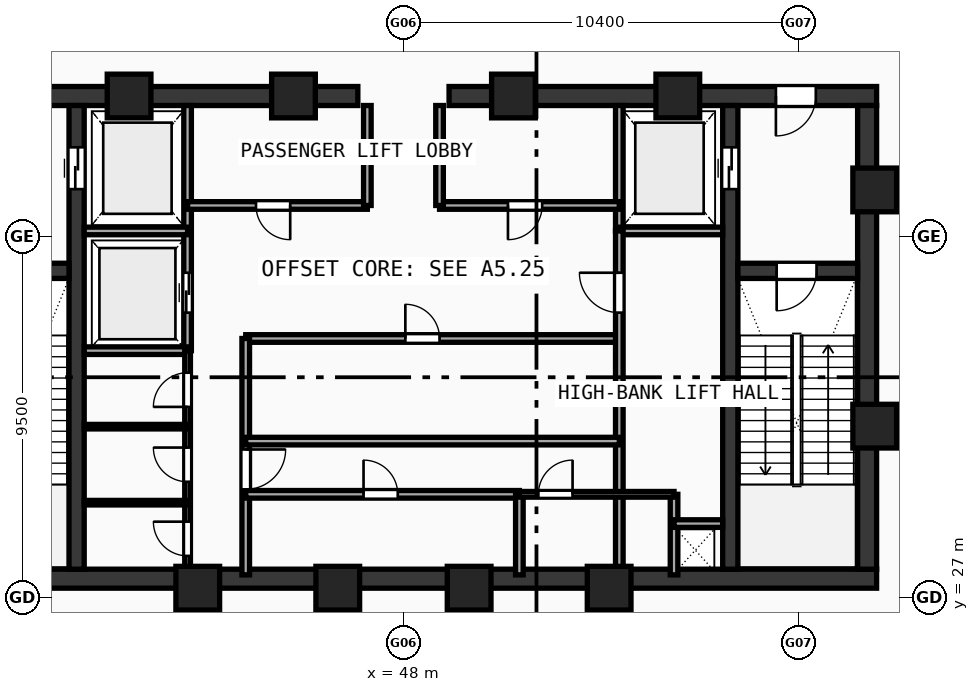
"""IFC4 building model, lengths in metres.
Left out: names, types, materials, properties, quantities, classifications, styles, units other than length and angle.
Written with IfcOpenShell. Run it as: python <this file> out.ifc"""

import sys

from ifc_helpers import new_model, si_unit, direction, frame, frame_2d, origin, origin_with_axes, origin_2d, place, context, subcontext, project, spatial, rectangle, hollow_rectangle, extrude, source, transform, mapped, element, fill, save


model = new_model("IFC4")
c1 = context("Model", 3, precision=1e-05, world=origin(), true_north=direction((0.0, 1.0)))
c2 = subcontext(c1, "Body", "Model", "MODEL_VIEW")
j1 = project(units=[si_unit("LENGTHUNIT", "METRE"), si_unit("PLANEANGLEUNIT", "RADIAN")], contexts=[c1])
p1 = place(None, origin())
s1 = spatial("IfcSite", under=j1, at=p1, CompositionType="ELEMENT")
p2 = place(p1, origin())
s2 = spatial("IfcBuilding", under=s1, at=p2, CompositionType="ELEMENT")
p3 = place(p2, frame((0.0, 0.0, 391.76)))
s3 = spatial("IfcBuildingStorey", under=s2, at=p3, CompositionType="ELEMENT", Elevation=391.76)
p4 = place(p3, frame((35.55, 27.5, 0.0), z_axis=(0.0, 0.0, 1.0), x_axis=(1.0, 0.0, 0.0)))
e1 = element("IfcWall", 1, at=p4, inside=s3, PredefinedType="SHEAR", context=c2, shape_type="SweptSolid", body=[
    extrude(rectangle(XDim=24.9, YDim=0.5, at=frame_2d((12.45, 0.0))), origin(), (0.0, 0.0, 1.0), 4.72),
])
p5 = place(p3, frame((35.55, 40.2, 0.0), z_axis=(0.0, 0.0, 1.0), x_axis=(1.0, 0.0, 0.0)))
e2 = element("IfcWall", 2, at=p5, inside=s3, PredefinedType="SHEAR", context=c2, shape_type="SweptSolid", body=[
    extrude(rectangle(XDim=11.25, YDim=0.5, at=frame_2d((5.625, 0.0))), origin(), (0.0, 0.0, 1.0), 4.72),
])
p6 = place(p5, frame((1.6, 0.0, 0.0)))
e3 = element("IfcOpeningElement", 3, at=p6, cuts=e2, PredefinedType="OPENING", context=c2, shape_type="SweptSolid", body=[
    extrude(rectangle(XDim=1.05, YDim=2.1, at=frame_2d((0.525, 1.05))), frame((0.0, 0.26, 0.0), z_axis=(0.0, -1.0, 0.0), x_axis=(1.0, 0.0, 0.0)), (0.0, 0.0, 1.0), 0.52),
])
p7 = place(p3, frame((49.2, 40.2, 0.0), z_axis=(0.0, 0.0, 1.0), x_axis=(1.0, 0.0, 0.0)))
e4 = element("IfcWall", 4, at=p7, inside=s3, PredefinedType="SHEAR", context=c2, shape_type="SweptSolid", body=[
    extrude(rectangle(XDim=11.25, YDim=0.5, at=frame_2d((5.625, 0.0))), origin(), (0.0, 0.0, 1.0), 4.72),
])
p8 = place(p7, frame((8.6, 0.0, 0.0)))
e5 = element("IfcOpeningElement", 5, at=p8, cuts=e4, PredefinedType="OPENING", context=c2, shape_type="SweptSolid", body=[
    extrude(rectangle(XDim=1.05, YDim=2.1, at=frame_2d((0.525, 1.05))), frame((0.0, 0.26, 0.0), z_axis=(0.0, -1.0, 0.0), x_axis=(1.0, 0.0, 0.0)), (0.0, 0.0, 1.0), 0.52),
])
p9 = place(p3, frame((60.2, 27.75, 0.0), z_axis=(0.0, 0.0, 1.0), x_axis=(0.0, 1.0, 0.0)))
e6 = element("IfcWall", 6, at=p9, inside=s3, PredefinedType="SHEAR", context=c2, shape_type="SweptSolid", body=[
    extrude(rectangle(XDim=12.2, YDim=0.5, at=frame_2d((6.1, 0.0))), origin(), (0.0, 0.0, 1.0), 4.72),
])
p10 = place(p3, frame((39.4, 27.75, 0.0), z_axis=(0.0, 0.0, 1.0), x_axis=(0.0, 1.0, 0.0)))
e7 = element("IfcWall", 7, at=p10, inside=s3, PredefinedType="SHEAR", context=c2, shape_type="SweptSolid", body=[
    extrude(rectangle(XDim=12.2, YDim=0.4, at=frame_2d((6.1, 0.0))), origin(), (0.0, 0.0, 1.0), 4.72),
])
p11 = place(p10, frame((10.0, 0.0, 0.0)))
e8 = element("IfcOpeningElement", 8, at=p11, cuts=e7, PredefinedType="OPENING", context=c2, shape_type="SweptSolid", body=[
    extrude(rectangle(XDim=1.1, YDim=2.1, at=frame_2d((0.55, 1.05))), frame((0.0, 0.21, 0.0), z_axis=(0.0, -1.0, 0.0), x_axis=(1.0, 0.0, 0.0)), (0.0, 0.0, 1.0), 0.42),
])
p12 = place(p3, frame((56.6, 27.75, 0.0), z_axis=(0.0, 0.0, 1.0), x_axis=(0.0, 1.0, 0.0)))
e9 = element("IfcWall", 9, at=p12, inside=s3, PredefinedType="SHEAR", context=c2, shape_type="SweptSolid", body=[
    extrude(rectangle(XDim=12.2, YDim=0.4, at=frame_2d((6.1, 0.0))), origin(), (0.0, 0.0, 1.0), 4.72),
])
p13 = place(p12, frame((10.0, 0.0, 0.0)))
e10 = element("IfcOpeningElement", 10, at=p13, cuts=e9, PredefinedType="OPENING", context=c2, shape_type="SweptSolid", body=[
    extrude(rectangle(XDim=1.1, YDim=2.1, at=frame_2d((0.55, 1.05))), frame((0.0, 0.21, 0.0), z_axis=(0.0, -1.0, 0.0), x_axis=(1.0, 0.0, 0.0)), (0.0, 0.0, 1.0), 0.42),
])
p14 = place(p3, frame((36.05, 35.6, 0.0), z_axis=(0.0, 0.0, 1.0), x_axis=(1.0, 0.0, 0.0)))
e11 = element("IfcWall", 11, at=p14, inside=s3, PredefinedType="SHEAR", context=c2, shape_type="SweptSolid", body=[
    extrude(rectangle(XDim=3.15, YDim=0.4, at=frame_2d((1.575, 0.0))), origin(), (0.0, 0.0, 1.0), 4.72),
])
p15 = place(p14, frame((1.07, 0.0, 0.0)))
e12 = element("IfcOpeningElement", 12, at=p15, cuts=e11, PredefinedType="OPENING", context=c2, shape_type="SweptSolid", body=[
    extrude(rectangle(XDim=1.05, YDim=2.1, at=frame_2d((0.525, 1.05))), frame((0.0, 0.21, 0.0), z_axis=(0.0, -1.0, 0.0), x_axis=(1.0, 0.0, 0.0)), (0.0, 0.0, 1.0), 0.42),
])
p16 = place(p3, frame((56.8, 35.6, 0.0), z_axis=(0.0, 0.0, 1.0), x_axis=(1.0, 0.0, 0.0)))
e13 = element("IfcWall", 13, at=p16, inside=s3, PredefinedType="SHEAR", context=c2, shape_type="SweptSolid", body=[
    extrude(rectangle(XDim=3.15, YDim=0.4, at=frame_2d((1.575, 0.0))), origin(), (0.0, 0.0, 1.0), 4.72),
])
p17 = place(p16, frame((1.02, 0.0, 0.0)))
e14 = element("IfcOpeningElement", 14, at=p17, cuts=e13, PredefinedType="OPENING", context=c2, shape_type="SweptSolid", body=[
    extrude(rectangle(XDim=1.05, YDim=2.1, at=frame_2d((0.525, 1.05))), frame((0.0, 0.21, 0.0), z_axis=(0.0, -1.0, 0.0), x_axis=(1.0, 0.0, 0.0)), (0.0, 0.0, 1.0), 0.42),
])
m1 = source(origin(), c2, "Body", "SweptSolid", [
    extrude(hollow_rectangle(XDim=1.15, YDim=1.15, WallThickness=0.048, at=origin_2d()), origin(), (0.0, 0.0, 1.0), 5.0),
])
for number, where, z_axis, x_axis in (
    (15, (42.588, 27.25, -0.28), (0.0, 0.0, 1.0), (1.0, 0.0, 0.0)),
    (16, (46.272, 27.25, -0.28), (0.0, 0.0, 1.0), (1.0, 0.0, 0.0)),
    (17, (49.729, 27.25, -0.28), (0.0, 0.0, 1.0), (1.0, 0.0, 0.0)),
    (18, (53.412, 27.25, -0.28), (0.0, 0.0, 1.0), (1.0, 0.0, 0.0)),
    (19, (60.4, 31.513, -0.28), (0.0, 0.0, 1.0), (1.0, 0.0, 0.0)),
    (20, (60.4, 37.729, -0.28), (0.0, 0.0, 1.0), (1.0, 0.0, 0.0)),
    (21, (55.219, 40.2, -0.28), (0.0, 0.0, 1.0), (1.0, 0.0, 0.0)),
    (22, (50.894, 40.2, -0.28), (0.0, 0.0, 1.0), (1.0, 0.0, 0.0)),
    (23, (45.106, 40.2, -0.28), (0.0, 0.0, 1.0), (1.0, 0.0, 0.0)),
    (24, (40.781, 40.2, -0.28), (0.0, 0.0, 1.0), (1.0, 0.0, 0.0)),
):
    element("IfcColumn", number, at=place(p3, frame(where, z_axis=z_axis, x_axis=x_axis)), inside=s3, PredefinedType="COLUMN", context=c2, shape_type="MappedRepresentation", body=[
        mapped(m1, transform((0.0, 0.0, 0.0), scale=1.0)),
    ])
p18 = place(p3, frame((42.32, 33.5, 0.0), z_axis=(0.0, 0.0, 1.0), x_axis=(0.0, 1.0, 0.0)))
e25 = element("IfcWall", 25, at=p18, inside=s3, PredefinedType="SOLIDWALL", context=c2, shape_type="SweptSolid", body=[
    extrude(rectangle(XDim=6.45, YDim=0.2, at=frame_2d((3.225, 0.0))), origin(), (0.0, 0.0, 1.0), 4.72),
])
p19 = place(p18, frame((1.0, 0.0, 0.0)))
e26 = element("IfcOpeningElement", 26, at=p19, cuts=e25, PredefinedType="OPENING", context=c2, shape_type="SweptSolid", body=[
    extrude(rectangle(XDim=1.05, YDim=2.1, at=frame_2d((0.525, 1.05))), frame((0.0, 0.11, 0.0), z_axis=(0.0, -1.0, 0.0), x_axis=(1.0, 0.0, 0.0)), (0.0, 0.0, 1.0), 0.22),
])
for number, where, z_axis, x_axis in (
    (27, (39.6, 36.65, 0.0), (0.0, 0.0, 1.0), (1.0, 0.0, 0.0)),
    (28, (39.6, 33.5, 0.0), (0.0, 0.0, 1.0), (1.0, 0.0, 0.0)),
):
    element("IfcWall", number, at=place(p3, frame(where, z_axis=z_axis, x_axis=x_axis)), inside=s3, PredefinedType="SOLIDWALL", context=c2, shape_type="SweptSolid", body=[
        extrude(rectangle(XDim=2.72, YDim=0.2, at=frame_2d((1.36, 0.0))), origin(), (0.0, 0.0, 1.0), 4.72),
    ])
p20 = place(p3, frame((53.68, 36.65, 0.0), z_axis=(0.0, 0.0, 1.0), x_axis=(0.0, 1.0, 0.0)))
e29 = element("IfcWall", 29, at=p20, inside=s3, PredefinedType="SOLIDWALL", context=c2, shape_type="SweptSolid", body=[
    extrude(rectangle(XDim=3.3, YDim=0.2, at=frame_2d((1.65, 0.0))), origin(), (0.0, 0.0, 1.0), 4.72),
])
p21 = place(p3, frame((53.68, 36.65, 0.0), z_axis=(0.0, 0.0, 1.0), x_axis=(1.0, 0.0, 0.0)))
e30 = element("IfcWall", 30, at=p21, inside=s3, PredefinedType="SOLIDWALL", context=c2, shape_type="SweptSolid", body=[
    extrude(rectangle(XDim=2.72, YDim=0.2, at=frame_2d((1.36, 0.0))), origin(), (0.0, 0.0, 1.0), 4.72),
])
p22 = place(p3, frame((42.32, 37.32, 0.0), z_axis=(0.0, 0.0, 1.0), x_axis=(1.0, 0.0, 0.0)))
e31 = element("IfcWall", 31, at=p22, inside=s3, PredefinedType="SOLIDWALL", context=c2, shape_type="SweptSolid", body=[
    extrude(rectangle(XDim=4.73, YDim=0.2, at=frame_2d((2.365, 0.0))), origin(), (0.0, 0.0, 1.0), 4.72),
])
p23 = place(p22, frame((1.8, 0.0, 0.0)))
e32 = element("IfcOpeningElement", 32, at=p23, cuts=e31, PredefinedType="OPENING", context=c2, shape_type="SweptSolid", body=[
    extrude(rectangle(XDim=0.9, YDim=2.1, at=frame_2d((0.45, 1.05))), frame((0.0, 0.11, 0.0), z_axis=(0.0, -1.0, 0.0), x_axis=(1.0, 0.0, 0.0)), (0.0, 0.0, 1.0), 0.22),
])
p24 = place(p3, frame((48.95, 37.32, 0.0), z_axis=(0.0, 0.0, 1.0), x_axis=(1.0, 0.0, 0.0)))
e33 = element("IfcWall", 33, at=p24, inside=s3, PredefinedType="SOLIDWALL", context=c2, shape_type="SweptSolid", body=[
    extrude(rectangle(XDim=4.73, YDim=0.2, at=frame_2d((2.365, 0.0))), origin(), (0.0, 0.0, 1.0), 4.72),
])
p25 = place(p24, frame((1.8, 0.0, 0.0)))
e34 = element("IfcOpeningElement", 34, at=p25, cuts=e33, PredefinedType="OPENING", context=c2, shape_type="SweptSolid", body=[
    extrude(rectangle(XDim=0.9, YDim=2.1, at=frame_2d((0.45, 1.05))), frame((0.0, 0.11, 0.0), z_axis=(0.0, -1.0, 0.0), x_axis=(1.0, 0.0, 0.0)), (0.0, 0.0, 1.0), 0.22),
])
for number, where, z_axis, x_axis in (
    (35, (47.05, 37.32, 0.0), (0.0, 0.0, 1.0), (0.0, 1.0, 0.0)),
    (36, (48.95, 37.32, 0.0), (0.0, 0.0, 1.0), (0.0, 1.0, 0.0)),
):
    element("IfcWall", number, at=place(p3, frame(where, z_axis=z_axis, x_axis=x_axis)), inside=s3, PredefinedType="SOLIDWALL", context=c2, shape_type="SweptSolid", body=[
        extrude(rectangle(XDim=2.63, YDim=0.2, at=frame_2d((1.315, 0.0))), origin(), (0.0, 0.0, 1.0), 4.72),
    ])
p26 = place(p3, frame((43.85, 33.82, 0.0), z_axis=(0.0, 0.0, 1.0), x_axis=(1.0, 0.0, 0.0)))
e37 = element("IfcWall", 37, at=p26, inside=s3, PredefinedType="SOLIDWALL", context=c2, shape_type="SweptSolid", body=[
    extrude(rectangle(XDim=9.83, YDim=0.2, at=frame_2d((4.915, 0.0))), origin(), (0.0, 0.0, 1.0), 4.72),
])
p27 = place(p26, frame((4.2, 0.0, 0.0)))
e38 = element("IfcOpeningElement", 38, at=p27, cuts=e37, PredefinedType="OPENING", context=c2, shape_type="SweptSolid", body=[
    extrude(rectangle(XDim=0.9, YDim=2.1, at=frame_2d((0.45, 1.05))), frame((0.0, 0.11, 0.0), z_axis=(0.0, -1.0, 0.0), x_axis=(1.0, 0.0, 0.0)), (0.0, 0.0, 1.0), 0.22),
])
p28 = place(p3, frame((43.85, 27.6, 0.0), z_axis=(0.0, 0.0, 1.0), x_axis=(0.0, 1.0, 0.0)))
e39 = element("IfcWall", 39, at=p28, inside=s3, PredefinedType="SOLIDWALL", context=c2, shape_type="SweptSolid", body=[
    extrude(rectangle(XDim=6.22, YDim=0.2, at=frame_2d((3.11, 0.0))), origin(), (0.0, 0.0, 1.0), 4.72),
])
p29 = place(p28, frame((2.25, 0.0, 0.0)))
e40 = element("IfcOpeningElement", 40, at=p29, cuts=e39, PredefinedType="OPENING", context=c2, shape_type="SweptSolid", body=[
    extrude(rectangle(XDim=1.05, YDim=2.1, at=frame_2d((0.525, 1.05))), frame((0.0, 0.11, 0.0), z_axis=(0.0, -1.0, 0.0), x_axis=(1.0, 0.0, 0.0)), (0.0, 0.0, 1.0), 0.22),
])
p30 = place(p3, frame((53.68, 27.6, 0.0), z_axis=(0.0, 0.0, 1.0), x_axis=(0.0, 1.0, 0.0)))
e41 = element("IfcWall", 41, at=p30, inside=s3, PredefinedType="SOLIDWALL", context=c2, shape_type="SweptSolid", body=[
    extrude(rectangle(XDim=9.05, YDim=0.2, at=frame_2d((4.525, 0.0))), origin(), (0.0, 0.0, 1.0), 4.72),
])
p31 = place(p30, frame((6.9, 0.0, 0.0)))
e42 = element("IfcOpeningElement", 42, at=p31, cuts=e41, PredefinedType="OPENING", context=c2, shape_type="SweptSolid", body=[
    extrude(rectangle(XDim=1.05, YDim=2.1, at=frame_2d((0.525, 1.05))), frame((0.0, 0.11, 0.0), z_axis=(0.0, -1.0, 0.0), x_axis=(1.0, 0.0, 0.0)), (0.0, 0.0, 1.0), 0.22),
])
p32 = place(p3, frame((43.85, 29.72, 0.0), z_axis=(0.0, 0.0, 1.0), x_axis=(1.0, 0.0, 0.0)))
e43 = element("IfcWall", 43, at=p32, inside=s3, PredefinedType="SOLIDWALL", context=c2, shape_type="SweptSolid", body=[
    extrude(rectangle(XDim=7.2, YDim=0.2, at=frame_2d((3.6, 0.0))), origin(), (0.0, 0.0, 1.0), 4.72),
])
p33 = place(p32, frame((3.1, 0.0, 0.0)))
e44 = element("IfcOpeningElement", 44, at=p33, cuts=e43, PredefinedType="OPENING", context=c2, shape_type="SweptSolid", body=[
    extrude(rectangle(XDim=0.9, YDim=2.1, at=frame_2d((0.45, 1.05))), frame((0.0, 0.11, 0.0), z_axis=(0.0, -1.0, 0.0), x_axis=(1.0, 0.0, 0.0)), (0.0, 0.0, 1.0), 0.22),
])
p34 = place(p3, frame((51.05, 27.6, 0.0), z_axis=(0.0, 0.0, 1.0), x_axis=(0.0, 1.0, 0.0)))
e45 = element("IfcWall", 45, at=p34, inside=s3, PredefinedType="SOLIDWALL", context=c2, shape_type="SweptSolid", body=[
    extrude(rectangle(XDim=2.12, YDim=0.2, at=frame_2d((1.06, 0.0))), origin(), (0.0, 0.0, 1.0), 4.72),
])
p35 = place(p3, frame((43.85, 31.12, 0.0), z_axis=(0.0, 0.0, 1.0), x_axis=(1.0, 0.0, 0.0)))
e46 = element("IfcWall", 46, at=p35, inside=s3, PredefinedType="SOLIDWALL", context=c2, shape_type="SweptSolid", body=[
    extrude(rectangle(XDim=9.83, YDim=0.2, at=frame_2d((4.915, 0.0))), origin(), (0.0, 0.0, 1.0), 4.72),
])
p36 = place(p3, frame((55.12, 27.6, 0.0), z_axis=(0.0, 0.0, 1.0), x_axis=(0.0, 1.0, 0.0)))
e47 = element("IfcWall", 47, at=p36, inside=s3, PredefinedType="SOLIDWALL", context=c2, shape_type="SweptSolid", body=[
    extrude(rectangle(XDim=2.12, YDim=0.2, at=frame_2d((1.06, 0.0))), origin(), (0.0, 0.0, 1.0), 4.72),
])
p37 = place(p3, frame((55.12, 28.95, 0.0), z_axis=(0.0, 0.0, 1.0), x_axis=(1.0, 0.0, 0.0)))
e48 = element("IfcWall", 48, at=p37, inside=s3, PredefinedType="SOLIDWALL", context=c2, shape_type="SweptSolid", body=[
    extrude(rectangle(XDim=1.28, YDim=0.2, at=frame_2d((0.64, 0.0))), origin(), (0.0, 0.0, 1.0), 4.72),
])
p38 = place(p3, frame((42.32, 27.6, 0.0), z_axis=(0.0, 0.0, 1.0), x_axis=(0.0, 1.0, 0.0)))
e49 = element("IfcWall", 49, at=p38, inside=s3, PredefinedType="PARTITIONING", context=c2, shape_type="SweptSolid", body=[
    extrude(rectangle(XDim=5.9, YDim=0.15, at=frame_2d((2.95, 0.0))), origin(), (0.0, 0.0, 1.0), 4.72),
])
p39 = place(p38, frame((0.5, 0.0, 0.0)))
e50 = element("IfcOpeningElement", 50, at=p39, cuts=e49, PredefinedType="OPENING", context=c2, shape_type="SweptSolid", body=[
    extrude(rectangle(XDim=0.9, YDim=2.1, at=frame_2d((0.45, 1.05))), frame((0.0, 0.085, 0.0), z_axis=(0.0, -1.0, 0.0), x_axis=(1.0, 0.0, 0.0)), (0.0, 0.0, 1.0), 0.17),
])
p40 = place(p38, frame((2.45, 0.0, 0.0)))
e51 = element("IfcOpeningElement", 51, at=p40, cuts=e49, PredefinedType="OPENING", context=c2, shape_type="SweptSolid", body=[
    extrude(rectangle(XDim=0.9, YDim=2.1, at=frame_2d((0.45, 1.05))), frame((0.0, 0.085, 0.0), z_axis=(0.0, -1.0, 0.0), x_axis=(1.0, 0.0, 0.0)), (0.0, 0.0, 1.0), 0.17),
])
p41 = place(p38, frame((4.42, 0.0, 0.0)))
e52 = element("IfcOpeningElement", 52, at=p41, cuts=e49, PredefinedType="OPENING", context=c2, shape_type="SweptSolid", body=[
    extrude(rectangle(XDim=0.9, YDim=2.1, at=frame_2d((0.45, 1.05))), frame((0.0, 0.085, 0.0), z_axis=(0.0, -1.0, 0.0), x_axis=(1.0, 0.0, 0.0)), (0.0, 0.0, 1.0), 0.17),
])
p42 = place(p3, frame((51.05, 29.72, 0.0), z_axis=(0.0, 0.0, 1.0), x_axis=(1.0, 0.0, 0.0)))
e53 = element("IfcWall", 53, at=p42, inside=s3, PredefinedType="PARTITIONING", context=c2, shape_type="SweptSolid", body=[
    extrude(rectangle(XDim=4.07, YDim=0.15, at=frame_2d((2.035, 0.0))), origin(), (0.0, 0.0, 1.0), 4.72),
])
p43 = place(p42, frame((0.5, 0.0, 0.0)))
e54 = element("IfcOpeningElement", 54, at=p43, cuts=e53, PredefinedType="OPENING", context=c2, shape_type="SweptSolid", body=[
    extrude(rectangle(XDim=0.9, YDim=2.1, at=frame_2d((0.45, 1.05))), frame((0.0, 0.085, 0.0), z_axis=(0.0, -1.0, 0.0), x_axis=(1.0, 0.0, 0.0)), (0.0, 0.0, 1.0), 0.17),
])
for number, where, z_axis, x_axis in (
    (55, (39.6, 29.5, 0.0), (0.0, 0.0, 1.0), (1.0, 0.0, 0.0)),
    (56, (39.6, 31.5, 0.0), (0.0, 0.0, 1.0), (1.0, 0.0, 0.0)),
):
    element("IfcWall", number, at=place(p3, frame(where, z_axis=z_axis, x_axis=x_axis)), inside=s3, PredefinedType="PARTITIONING", context=c2, shape_type="SweptSolid", body=[
        extrude(rectangle(XDim=2.72, YDim=0.12, at=frame_2d((1.36, 0.0))), origin(), (0.0, 0.0, 1.0), 4.72),
    ])
m2 = source(origin(), c2, "Body", "SweptSolid", [
    extrude(rectangle(XDim=1.05, YDim=2.1, at=frame_2d((0.525, 1.05))), frame((0.0, 0.025, 0.0), z_axis=(0.0, -1.0, 0.0), x_axis=(1.0, 0.0, 0.0)), (0.0, 0.0, 1.0), 0.05),
])
p44 = place(p17, frame((1.05, 0.0, 0.0), z_axis=(0.0, 0.0, 1.0), x_axis=(-1.0, 0.0, 0.0)))
e57 = element("IfcDoor", 57, at=p44, inside=s3, OperationType="SINGLE_SWING_RIGHT", PredefinedType="DOOR", context=c2, shape_type="MappedRepresentation", body=[
    mapped(m2, transform((0.0, 0.0, 0.0), scale=1.0)),
])
fill(e14, e57)
p45 = place(p8, frame((1.05, 0.0, 0.0), z_axis=(0.0, 0.0, 1.0), x_axis=(-1.0, 0.0, 0.0)))
e58 = element("IfcDoor", 58, at=p45, inside=s3, OperationType="SINGLE_SWING_RIGHT", PredefinedType="DOOR", context=c2, shape_type="MappedRepresentation", body=[
    mapped(m2, transform((0.0, 0.0, 0.0), scale=1.0)),
])
fill(e5, e58)
m3 = source(origin(), c2, "Body", "SweptSolid", [
    extrude(rectangle(XDim=1.1, YDim=2.1, at=frame_2d((0.55, 1.05))), frame((0.0, 0.025, 0.0), z_axis=(0.0, -1.0, 0.0), x_axis=(1.0, 0.0, 0.0)), (0.0, 0.0, 1.0), 0.05),
])
p46 = place(p11, frame((1.1, 0.0, 0.0), z_axis=(0.0, 0.0, 1.0), x_axis=(-1.0, 0.0, 0.0)))
e59 = element("IfcDoor", 59, at=p46, inside=s3, OperationType="DOUBLE_DOOR_SLIDING", PredefinedType="DOOR", context=c2, shape_type="MappedRepresentation", body=[
    mapped(m3, transform((0.0, 0.0, 0.0), scale=1.0)),
])
fill(e8, e59)
p47 = place(p13, origin_with_axes())
e60 = element("IfcDoor", 60, at=p47, inside=s3, OperationType="DOUBLE_DOOR_SLIDING", PredefinedType="DOOR", context=c2, shape_type="MappedRepresentation", body=[
    mapped(m3, transform((0.0, 0.0, 0.0), scale=1.0)),
])
fill(e10, e60)
p48 = place(p19, origin_with_axes())
e61 = element("IfcDoor", 61, at=p48, inside=s3, OperationType="DOUBLE_DOOR_SLIDING", PredefinedType="DOOR", context=c2, shape_type="MappedRepresentation", body=[
    mapped(m2, transform((0.0, 0.0, 0.0), scale=1.0)),
])
fill(e26, e61)
m4 = source(origin(), c2, "Body", "SweptSolid", [
    extrude(rectangle(XDim=0.9, YDim=2.1, at=frame_2d((0.45, 1.05))), frame((0.0, 0.025, 0.0), z_axis=(0.0, -1.0, 0.0), x_axis=(1.0, 0.0, 0.0)), (0.0, 0.0, 1.0), 0.05),
])
p49 = place(p23, frame((0.9, 0.0, 0.0), z_axis=(0.0, 0.0, 1.0), x_axis=(-1.0, 0.0, 0.0)))
e62 = element("IfcDoor", 62, at=p49, inside=s3, OperationType="SINGLE_SWING_LEFT", PredefinedType="DOOR", context=c2, shape_type="MappedRepresentation", body=[
    mapped(m4, transform((0.0, 0.0, 0.0), scale=1.0)),
])
fill(e32, e62)
p50 = place(p25, frame((0.9, 0.0, 0.0), z_axis=(0.0, 0.0, 1.0), x_axis=(-1.0, 0.0, 0.0)))
e63 = element("IfcDoor", 63, at=p50, inside=s3, OperationType="SINGLE_SWING_RIGHT", PredefinedType="DOOR", context=c2, shape_type="MappedRepresentation", body=[
    mapped(m4, transform((0.0, 0.0, 0.0), scale=1.0)),
])
fill(e34, e63)
p51 = place(p27, origin_with_axes())
e64 = element("IfcDoor", 64, at=p51, inside=s3, OperationType="SINGLE_SWING_LEFT", PredefinedType="DOOR", context=c2, shape_type="MappedRepresentation", body=[
    mapped(m4, transform((0.0, 0.0, 0.0), scale=1.0)),
])
fill(e38, e64)
p52 = place(p29, frame((1.05, 0.0, 0.0), z_axis=(0.0, 0.0, 1.0), x_axis=(-1.0, 0.0, 0.0)))
e65 = element("IfcDoor", 65, at=p52, inside=s3, OperationType="SINGLE_SWING_LEFT", PredefinedType="DOOR", context=c2, shape_type="MappedRepresentation", body=[
    mapped(m2, transform((0.0, 0.0, 0.0), scale=1.0)),
])
fill(e40, e65)
p53 = place(p31, origin_with_axes())
e66 = element("IfcDoor", 66, at=p53, inside=s3, OperationType="SINGLE_SWING_RIGHT", PredefinedType="DOOR", context=c2, shape_type="MappedRepresentation", body=[
    mapped(m2, transform((0.0, 0.0, 0.0), scale=1.0)),
])
fill(e42, e66)
p54 = place(p33, origin_with_axes())
e67 = element("IfcDoor", 67, at=p54, inside=s3, OperationType="SINGLE_SWING_LEFT", PredefinedType="DOOR", context=c2, shape_type="MappedRepresentation", body=[
    mapped(m4, transform((0.0, 0.0, 0.0), scale=1.0)),
])
fill(e44, e67)
p55 = place(p39, origin_with_axes())
e68 = element("IfcDoor", 68, at=p55, inside=s3, OperationType="SINGLE_SWING_RIGHT", PredefinedType="DOOR", context=c2, shape_type="MappedRepresentation", body=[
    mapped(m4, transform((0.0, 0.0, 0.0), scale=1.0)),
])
fill(e50, e68)
p56 = place(p40, origin_with_axes())
e69 = element("IfcDoor", 69, at=p56, inside=s3, OperationType="SINGLE_SWING_RIGHT", PredefinedType="DOOR", context=c2, shape_type="MappedRepresentation", body=[
    mapped(m4, transform((0.0, 0.0, 0.0), scale=1.0)),
])
fill(e51, e69)
p57 = place(p41, origin_with_axes())
e70 = element("IfcDoor", 70, at=p57, inside=s3, OperationType="SINGLE_SWING_LEFT", PredefinedType="DOOR", context=c2, shape_type="MappedRepresentation", body=[
    mapped(m4, transform((0.0, 0.0, 0.0), scale=1.0)),
])
fill(e52, e70)
p58 = place(p43, origin_with_axes())
e71 = element("IfcDoor", 71, at=p58, inside=s3, OperationType="SINGLE_SWING_RIGHT", PredefinedType="DOOR", context=c2, shape_type="MappedRepresentation", body=[
    mapped(m4, transform((0.0, 0.0, 0.0), scale=1.0)),
])
fill(e54, e71)
save(model, sys.argv[1])
